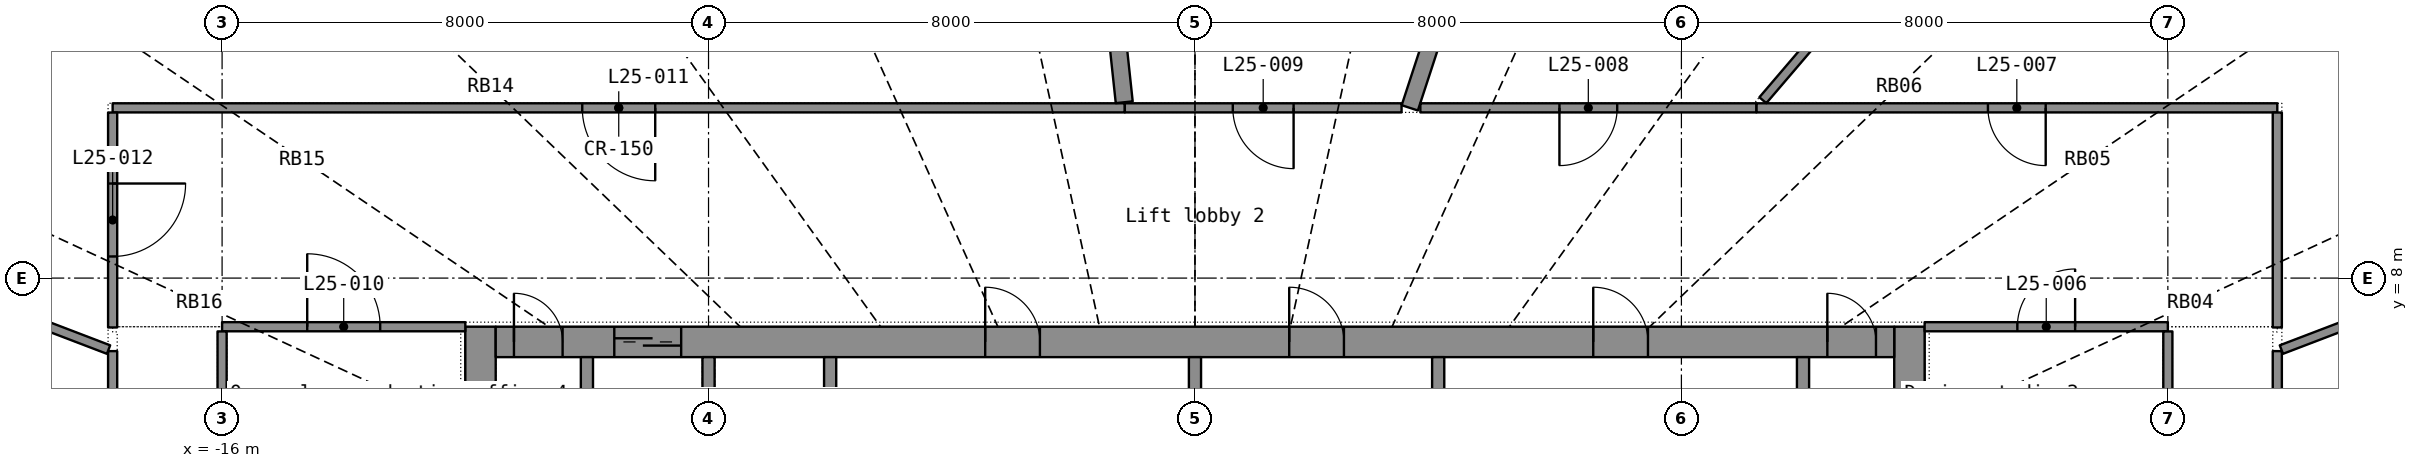
"""IFC4 building model, lengths in metres.
Left out: names, types, materials, properties, quantities, classifications, styles, units other than length and angle.
Written with IfcOpenShell. Run it as: python <this file> out.ifc"""

import sys

from ifc_helpers import new_model, si_unit, direction, frame, frame_2d, origin, place, context, subcontext, project, spatial, rectangle, extrude, element, fill, save


model = new_model("IFC4")
c1 = context("Model", 3, precision=1e-05, world=origin(), true_north=direction((0.0, 1.0)))
c2 = subcontext(c1, "Body", "Model", "MODEL_VIEW")
j1 = project(units=[si_unit("LENGTHUNIT", "METRE"), si_unit("PLANEANGLEUNIT", "RADIAN")], contexts=[c1])
p1 = place(None, origin())
s1 = spatial("IfcSite", under=j1, at=p1, CompositionType="ELEMENT")
p2 = place(p1, origin())
s2 = spatial("IfcBuilding", under=s1, at=p2, CompositionType="ELEMENT")
p3 = place(p2, frame((0.0, 0.0, 108.2)))
s3 = spatial("IfcBuildingStorey", under=s2, at=p3, CompositionType="ELEMENT", Elevation=108.2)
p4 = place(p3, frame((-11.75, -7.2, 0.0), z_axis=(0.0, 0.0, 1.0), x_axis=(0.0, 1.0, 0.0)))
e1 = element("IfcWall", 1, at=p4, inside=s3, PredefinedType="SHEAR", context=c2, shape_type="SweptSolid", body=[
    extrude(rectangle(XDim=14.4, YDim=0.5, at=frame_2d((7.2, 0.0))), origin(), (0.0, 0.0, 1.0), 3.3),
])
p5 = place(p4, frame((6.5, 0.0, 0.0)))
e2 = element("IfcOpeningElement", 2, at=p5, cuts=e1, PredefinedType="OPENING", context=c2, shape_type="SweptSolid", body=[
    extrude(rectangle(XDim=1.4, YDim=2.2, at=frame_2d((0.7, 1.1))), frame((0.0, 0.26, 0.0), z_axis=(0.0, -1.0, 0.0), x_axis=(1.0, 0.0, 0.0)), (0.0, 0.0, 1.0), 0.52),
])
p6 = place(p3, frame((11.75, -7.2, 0.0), z_axis=(0.0, 0.0, 1.0), x_axis=(0.0, 1.0, 0.0)))
e3 = element("IfcWall", 3, at=p6, inside=s3, PredefinedType="SHEAR", context=c2, shape_type="SweptSolid", body=[
    extrude(rectangle(XDim=14.4, YDim=0.5, at=frame_2d((7.2, 0.0))), origin(), (0.0, 0.0, 1.0), 3.3),
])
p7 = place(p6, frame((6.5, 0.0, 0.0)))
e4 = element("IfcOpeningElement", 4, at=p7, cuts=e3, PredefinedType="OPENING", context=c2, shape_type="SweptSolid", body=[
    extrude(rectangle(XDim=1.4, YDim=2.2, at=frame_2d((0.7, 1.1))), frame((0.0, 0.26, 0.0), z_axis=(0.0, -1.0, 0.0), x_axis=(1.0, 0.0, 0.0)), (0.0, 0.0, 1.0), 0.52),
])
p8 = place(p3, frame((-11.5, 6.95, 0.0), z_axis=(0.0, 0.0, 1.0), x_axis=(1.0, 0.0, 0.0)))
e5 = element("IfcWall", 5, at=p8, inside=s3, PredefinedType="SHEAR", context=c2, shape_type="SweptSolid", body=[
    extrude(rectangle(XDim=23.0, YDim=0.5, at=frame_2d((11.5, 0.0))), origin(), (0.0, 0.0, 1.0), 3.3),
])
p9 = place(p8, frame((1.95, 0.0, 0.0)))
e6 = element("IfcOpeningElement", 6, at=p9, cuts=e5, PredefinedType="OPENING", context=c2, shape_type="SweptSolid", body=[
    extrude(rectangle(XDim=1.1, YDim=2.2, at=frame_2d((0.55, 1.1))), frame((0.0, 0.26, 0.0), z_axis=(0.0, -1.0, 0.0), x_axis=(1.0, 0.0, 0.0)), (0.0, 0.0, 1.0), 0.52),
])
p10 = place(p8, frame((8.05, 0.0, 0.0)))
e7 = element("IfcOpeningElement", 7, at=p10, cuts=e5, PredefinedType="OPENING", context=c2, shape_type="SweptSolid", body=[
    extrude(rectangle(XDim=0.9, YDim=2.1, at=frame_2d((0.45, 1.05))), frame((0.0, 0.26, 0.0), z_axis=(0.0, -1.0, 0.0), x_axis=(1.0, 0.0, 0.0)), (0.0, 0.0, 1.0), 0.52),
])
p11 = place(p8, frame((13.05, 0.0, 0.0)))
e8 = element("IfcOpeningElement", 8, at=p11, cuts=e5, PredefinedType="OPENING", context=c2, shape_type="SweptSolid", body=[
    extrude(rectangle(XDim=0.9, YDim=2.1, at=frame_2d((0.45, 1.05))), frame((0.0, 0.26, 0.0), z_axis=(0.0, -1.0, 0.0), x_axis=(1.0, 0.0, 0.0)), (0.0, 0.0, 1.0), 0.52),
])
p12 = place(p8, frame((18.05, 0.0, 0.0)))
e9 = element("IfcOpeningElement", 9, at=p12, cuts=e5, PredefinedType="OPENING", context=c2, shape_type="SweptSolid", body=[
    extrude(rectangle(XDim=0.9, YDim=2.1, at=frame_2d((0.45, 1.05))), frame((0.0, 0.26, 0.0), z_axis=(0.0, -1.0, 0.0), x_axis=(1.0, 0.0, 0.0)), (0.0, 0.0, 1.0), 0.52),
])
p13 = place(p8, frame((0.3, 0.0, 0.0)))
e10 = element("IfcOpeningElement", 10, at=p13, cuts=e5, PredefinedType="OPENING", context=c2, shape_type="SweptSolid", body=[
    extrude(rectangle(XDim=0.8, YDim=2.05, at=frame_2d((0.4, 1.025))), frame((0.0, 0.26, 0.0), z_axis=(0.0, -1.0, 0.0), x_axis=(1.0, 0.0, 0.0)), (0.0, 0.0, 1.0), 0.52),
])
p14 = place(p8, frame((21.9, 0.0, 0.0)))
e11 = element("IfcOpeningElement", 11, at=p14, cuts=e5, PredefinedType="OPENING", context=c2, shape_type="SweptSolid", body=[
    extrude(rectangle(XDim=0.8, YDim=2.05, at=frame_2d((0.4, 1.025))), frame((0.0, 0.26, 0.0), z_axis=(0.0, -1.0, 0.0), x_axis=(1.0, 0.0, 0.0)), (0.0, 0.0, 1.0), 0.52),
])
for number, where, z_axis, x_axis in (
    (12, (-10.0, 3.9, 0.0), (0.0, 0.0, 1.0), (0.0, 1.0, 0.0)),
    (13, (-8.0, 3.9, 0.0), (0.0, 0.0, 1.0), (0.0, 1.0, 0.0)),
    (14, (-6.0, 3.9, 0.0), (0.0, 0.0, 1.0), (0.0, 1.0, 0.0)),
    (15, (10.0, 3.9, 0.0), (0.0, 0.0, 1.0), (0.0, 1.0, 0.0)),
):
    element("IfcWall", number, at=place(p3, frame(where, z_axis=z_axis, x_axis=x_axis)), inside=s3, PredefinedType="SHEAR", context=c2, shape_type="SweptSolid", body=[
        extrude(rectangle(XDim=2.8, YDim=0.2, at=frame_2d((1.4, 0.0))), origin(), (0.0, 0.0, 1.0), 3.3),
    ])
for number, where, z_axis, x_axis in (
    (16, (0.0, 3.9, 0.0), (0.0, 0.0, 1.0), (0.0, 1.0, 0.0)),
    (17, (4.0, 3.9, 0.0), (0.0, 0.0, 1.0), (0.0, 1.0, 0.0)),
):
    element("IfcWall", number, at=place(p3, frame(where, z_axis=z_axis, x_axis=x_axis)), inside=s3, PredefinedType="PARTITIONING", context=c2, shape_type="SweptSolid", body=[
        extrude(rectangle(XDim=2.8, YDim=0.2, at=frame_2d((1.4, 0.0))), origin(), (0.0, 0.0, 1.0), 3.3),
    ])
p15 = place(p3, frame((-1.154, 10.8, 0.0), z_axis=(0.0, 0.0, 1.0), x_axis=(-1.0, 0.0, 0.0)))
e18 = element("IfcWall", 18, at=p15, inside=s3, PredefinedType="PARTITIONING", context=c2, shape_type="SweptSolid", body=[
    extrude(rectangle(XDim=16.646, YDim=0.15, at=frame_2d((8.323, 0.0))), origin(), (0.0, 0.0, 1.0), 2.4),
])
p16 = place(p15, frame((7.723, 0.0, 0.0)))
e19 = element("IfcOpeningElement", 19, at=p16, cuts=e18, PredefinedType="OPENING", context=c2, shape_type="SweptSolid", body=[
    extrude(rectangle(XDim=1.2, YDim=2.2, at=frame_2d((0.6, 1.1))), frame((0.0, 0.085, 0.0), z_axis=(0.0, -1.0, 0.0), x_axis=(1.0, 0.0, 0.0)), (0.0, 0.0, 1.0), 0.17),
])
p17 = place(p3, frame((17.8, -6.799, 0.0), z_axis=(0.0, 0.0, 1.0), x_axis=(0.0, 1.0, 0.0)))
e20 = element("IfcWall", 20, at=p17, inside=s3, PredefinedType="PARTITIONING", context=c2, shape_type="SweptSolid", body=[
    extrude(rectangle(XDim=13.598, YDim=0.15, at=frame_2d((6.799, 0.0))), origin(), (0.0, 0.0, 1.0), 2.4),
])
p18 = place(p17, frame((6.199, 0.0, 0.0)))
e21 = element("IfcOpeningElement", 21, at=p18, cuts=e20, PredefinedType="OPENING", context=c2, shape_type="SweptSolid", body=[
    extrude(rectangle(XDim=1.2, YDim=2.2, at=frame_2d((0.6, 1.1))), frame((0.0, 0.085, 0.0), z_axis=(0.0, -1.0, 0.0), x_axis=(1.0, 0.0, 0.0)), (0.0, 0.0, 1.0), 0.17),
])
p19 = place(p3, frame((-17.8, 6.799, 0.0), z_axis=(0.0, 0.0, 1.0), x_axis=(0.0, -1.0, 0.0)))
e22 = element("IfcWall", 22, at=p19, inside=s3, PredefinedType="PARTITIONING", context=c2, shape_type="SweptSolid", body=[
    extrude(rectangle(XDim=10.706, YDim=0.15, at=frame_2d((5.353, 0.0))), origin(), (0.0, 0.0, 1.0), 2.4),
])
p20 = place(p19, frame((4.753, 0.0, 0.0)))
e23 = element("IfcOpeningElement", 23, at=p20, cuts=e22, PredefinedType="OPENING", context=c2, shape_type="SweptSolid", body=[
    extrude(rectangle(XDim=1.2, YDim=2.2, at=frame_2d((0.6, 1.1))), frame((0.0, 0.085, 0.0), z_axis=(0.0, -1.0, 0.0), x_axis=(1.0, 0.0, 0.0)), (0.0, 0.0, 1.0), 0.17),
])
p21 = place(p3, frame((-2.219, 20.775, 0.0), z_axis=(0.0, 0.0, 1.0), x_axis=(0.106213943, -0.9943433, 0.0)))
e24 = element("IfcWall", 24, at=p21, inside=s3, PredefinedType="PARTITIONING", context=c2, shape_type="SweptSolid", body=[
    extrude(rectangle(XDim=9.939, YDim=0.28, at=frame_2d((4.969, 0.0))), origin(), (0.0, 0.0, 1.0), 2.4),
])
p22 = place(p21, frame((4.219, 0.0, 1.0)))
e25 = element("IfcOpeningElement", 25, at=p22, cuts=e24, PredefinedType="OPENING", context=c2, shape_type="SweptSolid", body=[
    extrude(rectangle(XDim=1.5, YDim=1.2, at=frame_2d((0.75, 0.6))), frame((0.0, 0.15, 0.0), z_axis=(0.0, -1.0, 0.0), x_axis=(1.0, 0.0, 0.0)), (0.0, 0.0, 1.0), 0.3),
])
p23 = place(p3, frame((6.59, 20.144, 0.0), z_axis=(0.0, 0.0, 1.0), x_axis=(-0.310918337, -0.95043663, 0.0)))
e26 = element("IfcWall", 26, at=p23, inside=s3, PredefinedType="PARTITIONING", context=c2, shape_type="SweptSolid", body=[
    extrude(rectangle(XDim=9.831, YDim=0.28, at=frame_2d((4.916, 0.0))), origin(), (0.0, 0.0, 1.0), 2.4),
])
p24 = place(p3, frame((17.8, 10.8, 0.0), z_axis=(0.0, 0.0, 1.0), x_axis=(-1.0, 0.0, 0.0)))
e27 = element("IfcWall", 27, at=p24, inside=s3, PredefinedType="PARTITIONING", context=c2, shape_type="SweptSolid", body=[
    extrude(rectangle(XDim=8.568, YDim=0.15, at=frame_2d((4.284, 0.0))), origin(), (0.0, 0.0, 1.0), 2.4),
])
p25 = place(p24, frame((3.809, 0.0, 0.0)))
e28 = element("IfcOpeningElement", 28, at=p25, cuts=e27, PredefinedType="OPENING", context=c2, shape_type="SweptSolid", body=[
    extrude(rectangle(XDim=0.95, YDim=2.15, at=frame_2d((0.475, 1.075))), frame((0.0, 0.085, 0.0), z_axis=(0.0, -1.0, 0.0), x_axis=(1.0, 0.0, 0.0)), (0.0, 0.0, 1.0), 0.17),
])
p26 = place(p3, frame((14.607, 17.087, 0.0), z_axis=(0.0, 0.0, 1.0), x_axis=(-0.649776378, -0.760125423, 0.0)))
e29 = element("IfcWall", 29, at=p26, inside=s3, PredefinedType="PARTITIONING", context=c2, shape_type="SweptSolid", body=[
    extrude(rectangle(XDim=8.106, YDim=0.15, at=frame_2d((4.053, 0.0))), origin(), (0.0, 0.0, 1.0), 2.4),
])
p27 = place(p3, frame((9.231, 10.8, 0.0), z_axis=(0.0, 0.0, 1.0), x_axis=(-1.0, 0.0, 0.0)))
e30 = element("IfcWall", 30, at=p27, inside=s3, PredefinedType="PARTITIONING", context=c2, shape_type="SweptSolid", body=[
    extrude(rectangle(XDim=5.524, YDim=0.15, at=frame_2d((2.762, 0.0))), origin(), (0.0, 0.0, 1.0), 2.4),
])
p28 = place(p27, frame((2.287, 0.0, 0.0)))
e31 = element("IfcOpeningElement", 31, at=p28, cuts=e30, PredefinedType="OPENING", context=c2, shape_type="SweptSolid", body=[
    extrude(rectangle(XDim=0.95, YDim=2.15, at=frame_2d((0.475, 1.075))), frame((0.0, 0.085, 0.0), z_axis=(0.0, -1.0, 0.0), x_axis=(1.0, 0.0, 0.0)), (0.0, 0.0, 1.0), 0.17),
])
p29 = place(p3, frame((-23.094, 8.821, 0.0), z_axis=(0.0, 0.0, 1.0), x_axis=(0.934174226, -0.356817201, 0.0)))
e32 = element("IfcWall", 32, at=p29, inside=s3, PredefinedType="PARTITIONING", context=c2, shape_type="SweptSolid", body=[
    extrude(rectangle(XDim=5.595, YDim=0.15, at=frame_2d((2.797, 0.0))), origin(), (0.0, 0.0, 1.0), 2.4),
])
p30 = place(p3, frame((23.092, 8.82, 0.0), z_axis=(0.0, 0.0, 1.0), x_axis=(-0.934164423, -0.356842865, 0.0)))
e33 = element("IfcWall", 33, at=p30, inside=s3, PredefinedType="PARTITIONING", context=c2, shape_type="SweptSolid", body=[
    extrude(rectangle(XDim=5.593, YDim=0.15, at=frame_2d((2.796, 0.0))), origin(), (0.0, 0.0, 1.0), 2.4),
])
p31 = place(p3, frame((3.398, 10.8, 0.0), z_axis=(0.0, 0.0, 1.0), x_axis=(-1.0, 0.0, 0.0)))
e34 = element("IfcWall", 34, at=p31, inside=s3, PredefinedType="PARTITIONING", context=c2, shape_type="SweptSolid", body=[
    extrude(rectangle(XDim=4.551, YDim=0.15, at=frame_2d((2.276, 0.0))), origin(), (0.0, 0.0, 1.0), 2.4),
])
p32 = place(p31, frame((1.776, 0.0, 0.0)))
e35 = element("IfcOpeningElement", 35, at=p32, cuts=e34, PredefinedType="OPENING", context=c2, shape_type="SweptSolid", body=[
    extrude(rectangle(XDim=1.0, YDim=2.2, at=frame_2d((0.5, 1.1))), frame((0.0, 0.085, 0.0), z_axis=(0.0, -1.0, 0.0), x_axis=(1.0, 0.0, 0.0)), (0.0, 0.0, 1.0), 0.17),
])
p33 = place(p3, frame((-16.0, 7.2, 0.0), z_axis=(0.0, 0.0, 1.0), x_axis=(1.0, 0.0, 0.0)))
e36 = element("IfcWall", 36, at=p33, inside=s3, PredefinedType="PARTITIONING", context=c2, shape_type="SweptSolid", body=[
    extrude(rectangle(XDim=4.0, YDim=0.15, at=frame_2d((2.0, 0.0))), origin(), (0.0, 0.0, 1.0), 2.4),
])
p34 = place(p33, frame((1.4, 0.0, 0.0)))
e37 = element("IfcOpeningElement", 37, at=p34, cuts=e36, PredefinedType="OPENING", context=c2, shape_type="SweptSolid", body=[
    extrude(rectangle(XDim=1.2, YDim=2.2, at=frame_2d((0.6, 1.1))), frame((0.0, 0.085, 0.0), z_axis=(0.0, -1.0, 0.0), x_axis=(1.0, 0.0, 0.0)), (0.0, 0.0, 1.0), 0.17),
])
p35 = place(p3, frame((12.0, 7.2, 0.0), z_axis=(0.0, 0.0, 1.0), x_axis=(1.0, 0.0, 0.0)))
e38 = element("IfcWall", 38, at=p35, inside=s3, PredefinedType="PARTITIONING", context=c2, shape_type="SweptSolid", body=[
    extrude(rectangle(XDim=4.0, YDim=0.15, at=frame_2d((2.0, 0.0))), origin(), (0.0, 0.0, 1.0), 2.4),
])
p36 = place(p35, frame((1.525, 0.0, 0.0)))
e39 = element("IfcOpeningElement", 39, at=p36, cuts=e38, PredefinedType="OPENING", context=c2, shape_type="SweptSolid", body=[
    extrude(rectangle(XDim=0.95, YDim=2.15, at=frame_2d((0.475, 1.075))), frame((0.0, 0.085, 0.0), z_axis=(0.0, -1.0, 0.0), x_axis=(1.0, 0.0, 0.0)), (0.0, 0.0, 1.0), 0.17),
])
p37 = place(p3, frame((-17.8, 10.723, 0.0), z_axis=(0.0, 0.0, 1.0), x_axis=(0.0, -1.0, 0.0)))
e40 = element("IfcWall", 40, at=p37, inside=s3, PredefinedType="PARTITIONING", context=c2, shape_type="SweptSolid", body=[
    extrude(rectangle(XDim=3.535, YDim=0.15, at=frame_2d((1.768, 0.0))), origin(), (0.0, 0.0, 1.0), 2.4),
])
p38 = place(p37, frame((1.167, 0.0, 0.0)))
e41 = element("IfcOpeningElement", 41, at=p38, cuts=e40, PredefinedType="OPENING", context=c2, shape_type="SweptSolid", body=[
    extrude(rectangle(XDim=1.2, YDim=2.2, at=frame_2d((0.6, 1.1))), frame((0.0, 0.085, 0.0), z_axis=(0.0, -1.0, 0.0), x_axis=(1.0, 0.0, 0.0)), (0.0, 0.0, 1.0), 0.17),
])
p39 = place(p3, frame((17.8, 7.188, 0.0), z_axis=(0.0, 0.0, 1.0), x_axis=(0.0, 1.0, 0.0)))
e42 = element("IfcWall", 42, at=p39, inside=s3, PredefinedType="PARTITIONING", context=c2, shape_type="SweptSolid", body=[
    extrude(rectangle(XDim=3.535, YDim=0.15, at=frame_2d((1.768, 0.0))), origin(), (0.0, 0.0, 1.0), 2.4),
])
for number, where, z_axis, x_axis in (
    (43, (-16.0, 6.112, 0.0), (0.0, 0.0, 1.0), (0.0, 1.0, 0.0)),
    (44, (16.0, 7.123, 0.0), (0.0, 0.0, 1.0), (0.0, -1.0, 0.0)),
):
    element("IfcWall", number, at=place(p3, frame(where, z_axis=z_axis, x_axis=x_axis)), inside=s3, PredefinedType="PARTITIONING", context=c2, shape_type="SweptSolid", body=[
        extrude(rectangle(XDim=1.011, YDim=0.15, at=frame_2d((0.505, 0.0))), origin(), (0.0, 0.0, 1.0), 2.4),
    ])
p40 = place(p9, origin())
e45 = element("IfcDoor", 45, at=p40, inside=s3, OperationType="DOUBLE_DOOR_SLIDING", PredefinedType="DOOR", context=c2, shape_type="SweptSolid", body=[
    extrude(rectangle(XDim=1.1, YDim=2.2, at=frame_2d((0.55, 1.1))), frame((0.0, 0.025, 0.0), z_axis=(0.0, -1.0, 0.0), x_axis=(1.0, 0.0, 0.0)), (0.0, 0.0, 1.0), 0.05),
])
fill(e6, e45)
p41 = place(p10, origin())
e46 = element("IfcDoor", 46, at=p41, inside=s3, OperationType="SINGLE_SWING_LEFT", PredefinedType="DOOR", context=c2, shape_type="SweptSolid", body=[
    extrude(rectangle(XDim=0.9, YDim=2.1, at=frame_2d((0.45, 1.05))), frame((0.0, 0.025, 0.0), z_axis=(0.0, -1.0, 0.0), x_axis=(1.0, 0.0, 0.0)), (0.0, 0.0, 1.0), 0.05),
])
fill(e7, e46)
p42 = place(p11, origin())
e47 = element("IfcDoor", 47, at=p42, inside=s3, OperationType="SINGLE_SWING_LEFT", PredefinedType="DOOR", context=c2, shape_type="SweptSolid", body=[
    extrude(rectangle(XDim=0.9, YDim=2.1, at=frame_2d((0.45, 1.05))), frame((0.0, 0.025, 0.0), z_axis=(0.0, -1.0, 0.0), x_axis=(1.0, 0.0, 0.0)), (0.0, 0.0, 1.0), 0.05),
])
fill(e8, e47)
p43 = place(p12, origin())
e48 = element("IfcDoor", 48, at=p43, inside=s3, OperationType="SINGLE_SWING_LEFT", PredefinedType="DOOR", context=c2, shape_type="SweptSolid", body=[
    extrude(rectangle(XDim=0.9, YDim=2.1, at=frame_2d((0.45, 1.05))), frame((0.0, 0.025, 0.0), z_axis=(0.0, -1.0, 0.0), x_axis=(1.0, 0.0, 0.0)), (0.0, 0.0, 1.0), 0.05),
])
fill(e9, e48)
p44 = place(p13, origin())
e49 = element("IfcDoor", 49, at=p44, inside=s3, OperationType="SINGLE_SWING_LEFT", PredefinedType="DOOR", context=c2, shape_type="SweptSolid", body=[
    extrude(rectangle(XDim=0.8, YDim=2.05, at=frame_2d((0.4, 1.025))), frame((0.0, 0.025, 0.0), z_axis=(0.0, -1.0, 0.0), x_axis=(1.0, 0.0, 0.0)), (0.0, 0.0, 1.0), 0.05),
])
fill(e10, e49)
p45 = place(p14, origin())
e50 = element("IfcDoor", 50, at=p45, inside=s3, OperationType="SINGLE_SWING_LEFT", PredefinedType="DOOR", context=c2, shape_type="SweptSolid", body=[
    extrude(rectangle(XDim=0.8, YDim=2.05, at=frame_2d((0.4, 1.025))), frame((0.0, 0.025, 0.0), z_axis=(0.0, -1.0, 0.0), x_axis=(1.0, 0.0, 0.0)), (0.0, 0.0, 1.0), 0.05),
])
fill(e11, e50)
p46 = place(p36, origin())
e51 = element("IfcDoor", 51, at=p46, inside=s3, OperationType="SINGLE_SWING_RIGHT", PredefinedType="DOOR", context=c2, shape_type="SweptSolid", body=[
    extrude(rectangle(XDim=0.95, YDim=2.15, at=frame_2d((0.475, 1.075))), frame((0.0, 0.025, 0.0), z_axis=(0.0, -1.0, 0.0), x_axis=(1.0, 0.0, 0.0)), (0.0, 0.0, 1.0), 0.05),
])
fill(e39, e51)
p47 = place(p25, origin())
e52 = element("IfcDoor", 52, at=p47, inside=s3, OperationType="SINGLE_SWING_LEFT", PredefinedType="DOOR", context=c2, shape_type="SweptSolid", body=[
    extrude(rectangle(XDim=0.95, YDim=2.15, at=frame_2d((0.475, 1.075))), frame((0.0, 0.025, 0.0), z_axis=(0.0, -1.0, 0.0), x_axis=(1.0, 0.0, 0.0)), (0.0, 0.0, 1.0), 0.05),
])
fill(e28, e52)
p48 = place(p28, origin())
e53 = element("IfcDoor", 53, at=p48, inside=s3, OperationType="SINGLE_SWING_RIGHT", PredefinedType="DOOR", context=c2, shape_type="SweptSolid", body=[
    extrude(rectangle(XDim=0.95, YDim=2.15, at=frame_2d((0.475, 1.075))), frame((0.0, 0.025, 0.0), z_axis=(0.0, -1.0, 0.0), x_axis=(1.0, 0.0, 0.0)), (0.0, 0.0, 1.0), 0.05),
])
fill(e31, e53)
p49 = place(p32, origin())
e54 = element("IfcDoor", 54, at=p49, inside=s3, OperationType="SINGLE_SWING_LEFT", PredefinedType="DOOR", context=c2, shape_type="SweptSolid", body=[
    extrude(rectangle(XDim=1.0, YDim=2.2, at=frame_2d((0.5, 1.1))), frame((0.0, 0.025, 0.0), z_axis=(0.0, -1.0, 0.0), x_axis=(1.0, 0.0, 0.0)), (0.0, 0.0, 1.0), 0.05),
])
fill(e35, e54)
p50 = place(p34, origin())
e55 = element("IfcDoor", 55, at=p50, inside=s3, OperationType="DOUBLE_DOOR_SINGLE_SWING", PredefinedType="DOOR", context=c2, shape_type="SweptSolid", body=[
    extrude(rectangle(XDim=1.2, YDim=2.2, at=frame_2d((0.6, 1.1))), frame((0.0, 0.025, 0.0), z_axis=(0.0, -1.0, 0.0), x_axis=(1.0, 0.0, 0.0)), (0.0, 0.0, 1.0), 0.05),
])
fill(e37, e55)
p51 = place(p16, origin())
e56 = element("IfcDoor", 56, at=p51, inside=s3, OperationType="DOUBLE_DOOR_SINGLE_SWING", PredefinedType="DOOR", context=c2, shape_type="SweptSolid", body=[
    extrude(rectangle(XDim=1.2, YDim=2.2, at=frame_2d((0.6, 1.1))), frame((0.0, 0.025, 0.0), z_axis=(0.0, -1.0, 0.0), x_axis=(1.0, 0.0, 0.0)), (0.0, 0.0, 1.0), 0.05),
])
fill(e19, e56)
p52 = place(p38, origin())
e57 = element("IfcDoor", 57, at=p52, inside=s3, OperationType="DOUBLE_DOOR_SINGLE_SWING", PredefinedType="DOOR", context=c2, shape_type="SweptSolid", body=[
    extrude(rectangle(XDim=1.2, YDim=2.2, at=frame_2d((0.6, 1.1))), frame((0.0, 0.025, 0.0), z_axis=(0.0, -1.0, 0.0), x_axis=(1.0, 0.0, 0.0)), (0.0, 0.0, 1.0), 0.05),
])
fill(e41, e57)
save(model, sys.argv[1])
